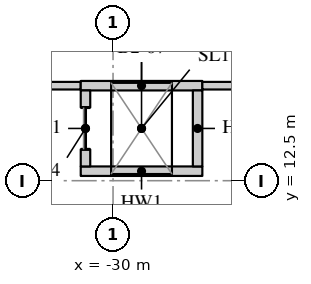
"""IFC4 building model, lengths in metres.
Left out: names, types, materials, properties, quantities, classifications, styles, units other than length and angle.
Written with IfcOpenShell. Run it as: python <this file> out.ifc"""

import sys

from ifc_helpers import new_model, si_unit, direction, frame, frame_2d, origin, place, context, subcontext, project, spatial, rectangle, extrude, element, fill, save


model = new_model("IFC4")
c1 = context("Model", 3, precision=1e-05, world=origin(), true_north=direction((0.0, 1.0)))
c2 = subcontext(c1, "Body", "Model", "MODEL_VIEW")
j1 = project(units=[si_unit("LENGTHUNIT", "METRE"), si_unit("PLANEANGLEUNIT", "RADIAN")], contexts=[c1])
p1 = place(None, origin())
s1 = spatial("IfcSite", under=j1, at=p1, CompositionType="ELEMENT")
p2 = place(p1, origin())
s2 = spatial("IfcBuilding", under=s1, at=p2, CompositionType="ELEMENT")
p3 = place(p2, frame((0.0, 0.0, -10.4)))
s3 = spatial("IfcBuildingStorey", under=s2, at=p3, CompositionType="ELEMENT", Elevation=-10.4)
p4 = place(p3, frame((-30.85, 12.75, 0.0), z_axis=(0.0, 0.0, 1.0), x_axis=(1.0, 0.0, 0.0)))
e1 = element("IfcWall", 1, at=p4, inside=s3, PredefinedType="SHEAR", context=c2, shape_type="SweptSolid", body=[
    extrude(rectangle(XDim=3.2, YDim=0.25, at=frame_2d((1.6, 0.0))), origin(), (0.0, 0.0, 1.0), 4.75),
])
p5 = place(p3, frame((-37.915, 15.0, 0.0), z_axis=(0.0, 0.0, 1.0), x_axis=(1.0, 0.0, 0.0)))
e2 = element("IfcWall", 2, at=p5, inside=s3, PredefinedType="PARTITIONING", context=c2, shape_type="SweptSolid", body=[
    extrude(rectangle(XDim=7.065, YDim=0.2, at=frame_2d((3.532, 0.0))), origin(), (0.0, 0.0, 1.0), 4.75),
])
p6 = place(p5, frame((2.015, 0.0, 0.0)))
e3 = element("IfcOpeningElement", 3, at=p6, cuts=e2, PredefinedType="OPENING", context=c2, shape_type="SweptSolid", body=[
    extrude(rectangle(XDim=1.8, YDim=2.1, at=frame_2d((0.9, 1.05))), frame((0.0, 0.11, 0.0), z_axis=(0.0, -1.0, 0.0), x_axis=(1.0, 0.0, 0.0)), (0.0, 0.0, 1.0), 0.22),
])
p7 = place(p3, frame((-30.85, 15.0, 0.0), z_axis=(0.0, 0.0, 1.0), x_axis=(1.0, 0.0, 0.0)))
e4 = element("IfcWall", 4, at=p7, inside=s3, PredefinedType="SHEAR", context=c2, shape_type="SweptSolid", body=[
    extrude(rectangle(XDim=3.2, YDim=0.25, at=frame_2d((1.6, 0.0))), origin(), (0.0, 0.0, 1.0), 4.75),
])
p8 = place(p3, frame((-27.65, 15.0, 0.0), z_axis=(0.0, 0.0, 1.0), x_axis=(1.0, 0.0, 0.0)))
e5 = element("IfcWall", 5, at=p8, inside=s3, PredefinedType="PARTITIONING", context=c2, shape_type="SweptSolid", body=[
    extrude(rectangle(XDim=31.75, YDim=0.2, at=frame_2d((15.875, 0.0))), origin(), (0.0, 0.0, 1.0), 4.15),
])
p9 = place(p8, frame((2.75, 0.0, 0.0)))
e6 = element("IfcOpeningElement", 6, at=p9, cuts=e5, PredefinedType="OPENING", context=c2, shape_type="SweptSolid", body=[
    extrude(rectangle(XDim=1.8, YDim=2.1, at=frame_2d((0.9, 1.05))), frame((0.0, 0.11, 0.0), z_axis=(0.0, -1.0, 0.0), x_axis=(1.0, 0.0, 0.0)), (0.0, 0.0, 1.0), 0.22),
])
p10 = place(p8, frame((18.75, 0.0, 0.0)))
e7 = element("IfcOpeningElement", 7, at=p10, cuts=e5, PredefinedType="OPENING", context=c2, shape_type="SweptSolid", body=[
    extrude(rectangle(XDim=1.8, YDim=2.1, at=frame_2d((0.9, 1.05))), frame((0.0, 0.11, 0.0), z_axis=(0.0, -1.0, 0.0), x_axis=(1.0, 0.0, 0.0)), (0.0, 0.0, 1.0), 0.22),
])
p11 = place(p3, frame((-30.725, 12.875, 0.0), z_axis=(0.0, 0.0, 1.0), x_axis=(0.0, 1.0, 0.0)))
e8 = element("IfcWall", 8, at=p11, inside=s3, PredefinedType="SHEAR", context=c2, shape_type="SweptSolid", body=[
    extrude(rectangle(XDim=2.0, YDim=0.25, at=frame_2d((1.0, 0.0))), origin(), (0.0, 0.0, 1.0), 4.75),
])
p12 = place(p11, frame((0.45, 0.0, 0.0)))
e9 = element("IfcOpeningElement", 9, at=p12, cuts=e8, PredefinedType="OPENING", context=c2, shape_type="SweptSolid", body=[
    extrude(rectangle(XDim=1.1, YDim=2.1, at=frame_2d((0.55, 1.05))), frame((0.0, 0.135, 0.0), z_axis=(0.0, -1.0, 0.0), x_axis=(1.0, 0.0, 0.0)), (0.0, 0.0, 1.0), 0.27),
])
p13 = place(p3, frame((-27.775, 12.875, 0.0), z_axis=(0.0, 0.0, 1.0), x_axis=(0.0, 1.0, 0.0)))
e10 = element("IfcWall", 10, at=p13, inside=s3, PredefinedType="SHEAR", context=c2, shape_type="SweptSolid", body=[
    extrude(rectangle(XDim=2.0, YDim=0.25, at=frame_2d((1.0, 0.0))), origin(), (0.0, 0.0, 1.0), 4.75),
])
p14 = place(p12, origin())
e11 = element("IfcDoor", 11, at=p14, inside=s3, OperationType="SLIDING_TO_LEFT", PredefinedType="DOOR", context=c2, shape_type="SweptSolid", body=[
    extrude(rectangle(XDim=1.1, YDim=2.1, at=frame_2d((0.55, 1.05))), frame((0.0, 0.025, 0.0), z_axis=(0.0, -1.0, 0.0), x_axis=(1.0, 0.0, 0.0)), (0.0, 0.0, 1.0), 0.05),
])
fill(e9, e11)
save(model, sys.argv[1])
